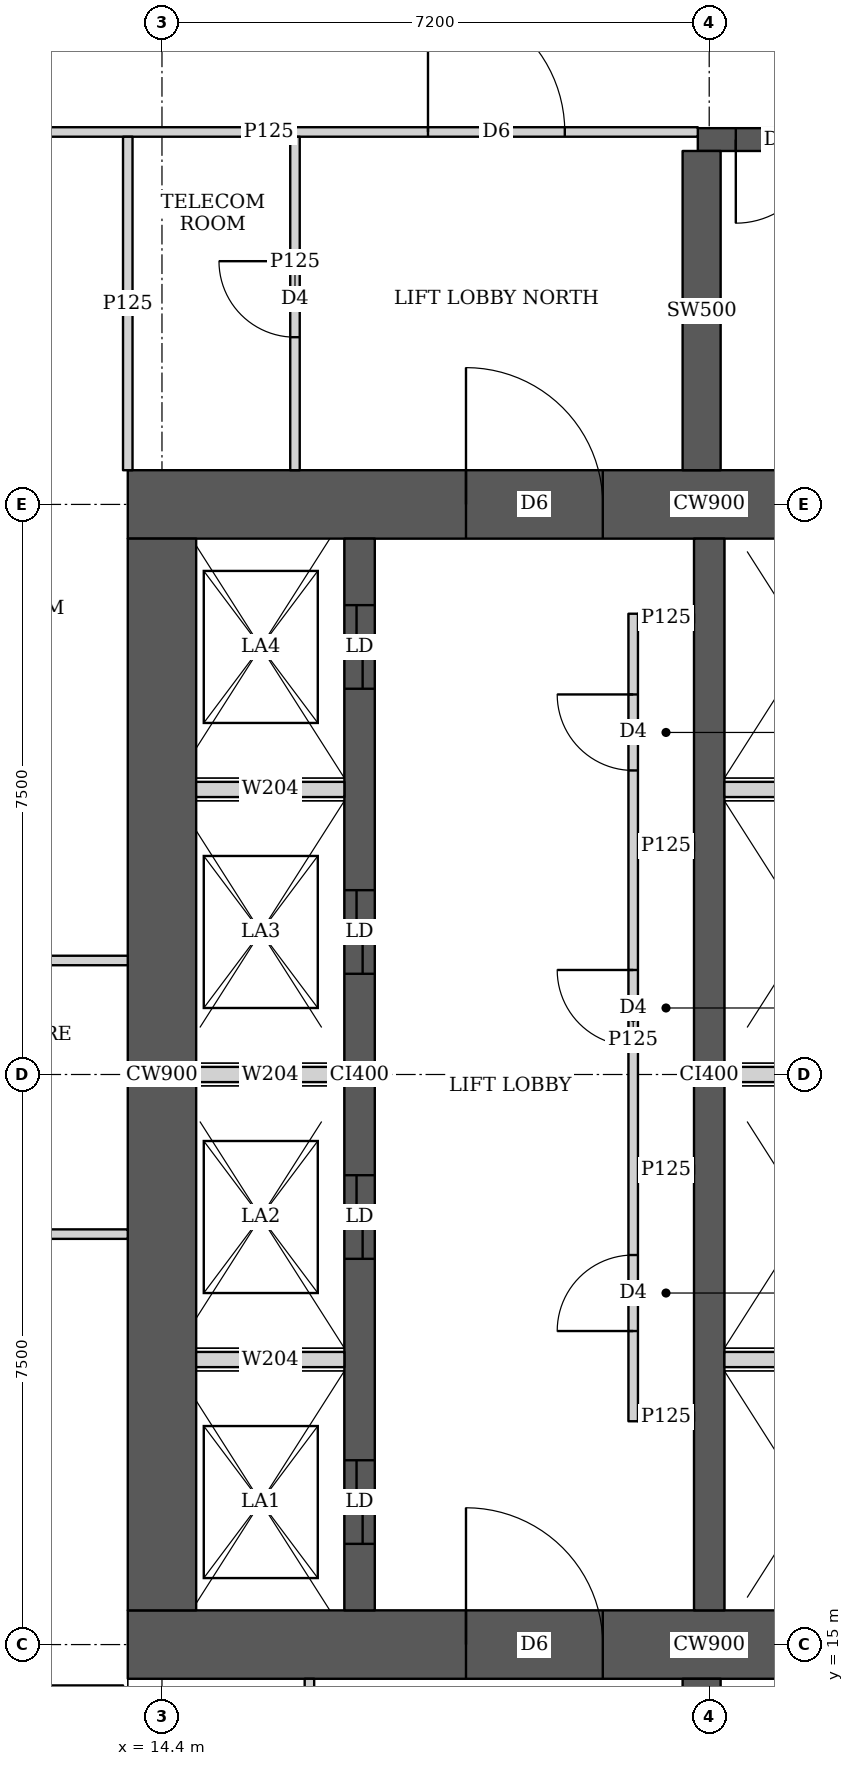
"""IFC4 building model, lengths in metres.
Left out: names, types, materials, properties, quantities, classifications, styles, units other than length and angle.
Written with IfcOpenShell. Run it as: python <this file> out.ifc"""

import sys

from ifc_helpers import new_model, si_unit, direction, frame, frame_2d, origin, place, context, subcontext, project, spatial, rectangle, extrude, element, fill, save


model = new_model("IFC4")
c1 = context("Model", 3, precision=1e-05, world=origin(), true_north=direction((0.0, 1.0)))
c2 = subcontext(c1, "Body", "Model", "MODEL_VIEW")
j1 = project(units=[si_unit("LENGTHUNIT", "METRE"), si_unit("PLANEANGLEUNIT", "RADIAN")], contexts=[c1])
p1 = place(None, origin())
s1 = spatial("IfcSite", under=j1, at=p1, CompositionType="ELEMENT")
p2 = place(p1, origin())
s2 = spatial("IfcBuilding", under=s1, at=p2, CompositionType="ELEMENT")
p3 = place(p2, frame((0.0, 0.0, 31.25)))
s3 = spatial("IfcBuildingStorey", under=s2, at=p3, CompositionType="ELEMENT", Elevation=31.25)
p4 = place(p3, frame((13.95, 15.0, 0.0), z_axis=(0.0, 0.0, 1.0), x_axis=(1.0, 0.0, 0.0)))
e1 = element("IfcWall", 1, at=p4, inside=s3, PredefinedType="SHEAR", context=c2, shape_type="SweptSolid", body=[
    extrude(rectangle(XDim=15.3, YDim=0.9, at=frame_2d((7.65, 0.0))), origin(), (0.0, 0.0, 1.0), 3.75),
])
p5 = place(p4, frame((4.45, 0.0, 0.0)))
e2 = element("IfcOpeningElement", 2, at=p5, cuts=e1, PredefinedType="OPENING", context=c2, shape_type="SweptSolid", body=[
    extrude(rectangle(XDim=1.8, YDim=2.1, at=frame_2d((0.9, 1.05))), frame((0.0, 0.46, 0.0), z_axis=(0.0, -1.0, 0.0), x_axis=(1.0, 0.0, 0.0)), (0.0, 0.0, 1.0), 0.92),
])
p6 = place(p4, frame((10.7, 0.0, 0.0)))
e3 = element("IfcOpeningElement", 3, at=p6, cuts=e1, PredefinedType="OPENING", context=c2, shape_type="SweptSolid", body=[
    extrude(rectangle(XDim=1.1, YDim=2.1, at=frame_2d((0.55, 1.05))), frame((0.0, 0.46, 0.0), z_axis=(0.0, -1.0, 0.0), x_axis=(1.0, 0.0, 0.0)), (0.0, 0.0, 1.0), 0.92),
])
p7 = place(p3, frame((13.95, 30.0, 0.0), z_axis=(0.0, 0.0, 1.0), x_axis=(1.0, 0.0, 0.0)))
e4 = element("IfcWall", 4, at=p7, inside=s3, PredefinedType="SHEAR", context=c2, shape_type="SweptSolid", body=[
    extrude(rectangle(XDim=15.3, YDim=0.9, at=frame_2d((7.65, 0.0))), origin(), (0.0, 0.0, 1.0), 3.75),
])
p8 = place(p7, frame((4.45, 0.0, 0.0)))
e5 = element("IfcOpeningElement", 5, at=p8, cuts=e4, PredefinedType="OPENING", context=c2, shape_type="SweptSolid", body=[
    extrude(rectangle(XDim=1.8, YDim=2.1, at=frame_2d((0.9, 1.05))), frame((0.0, 0.46, 0.0), z_axis=(0.0, -1.0, 0.0), x_axis=(1.0, 0.0, 0.0)), (0.0, 0.0, 1.0), 0.92),
])
p9 = place(p7, frame((10.7, 0.0, 0.0)))
e6 = element("IfcOpeningElement", 6, at=p9, cuts=e4, PredefinedType="OPENING", context=c2, shape_type="SweptSolid", body=[
    extrude(rectangle(XDim=1.1, YDim=2.1, at=frame_2d((0.55, 1.05))), frame((0.0, 0.46, 0.0), z_axis=(0.0, -1.0, 0.0), x_axis=(1.0, 0.0, 0.0)), (0.0, 0.0, 1.0), 0.92),
])
p10 = place(p3, frame((14.4, 15.45, 0.0), z_axis=(0.0, 0.0, 1.0), x_axis=(0.0, 1.0, 0.0)))
e7 = element("IfcWall", 7, at=p10, inside=s3, PredefinedType="SHEAR", context=c2, shape_type="SweptSolid", body=[
    extrude(rectangle(XDim=14.1, YDim=0.9, at=frame_2d((7.05, 0.0))), origin(), (0.0, 0.0, 1.0), 3.75),
])
p11 = place(p3, frame((17.0, 15.45, 0.0), z_axis=(0.0, 0.0, 1.0), x_axis=(0.0, 1.0, 0.0)))
e8 = element("IfcWall", 8, at=p11, inside=s3, PredefinedType="SHEAR", context=c2, shape_type="SweptSolid", body=[
    extrude(rectangle(XDim=14.1, YDim=0.4, at=frame_2d((7.05, 0.0))), origin(), (0.0, 0.0, 1.0), 3.75),
])
p12 = place(p11, frame((0.875, 0.0, 0.0)))
e9 = element("IfcOpeningElement", 9, at=p12, cuts=e8, PredefinedType="OPENING", context=c2, shape_type="SweptSolid", body=[
    extrude(rectangle(XDim=1.1, YDim=2.1, at=frame_2d((0.55, 1.05))), frame((0.0, 0.21, 0.0), z_axis=(0.0, -1.0, 0.0), x_axis=(1.0, 0.0, 0.0)), (0.0, 0.0, 1.0), 0.42),
])
p13 = place(p11, frame((4.625, 0.0, 0.0)))
e10 = element("IfcOpeningElement", 10, at=p13, cuts=e8, PredefinedType="OPENING", context=c2, shape_type="SweptSolid", body=[
    extrude(rectangle(XDim=1.1, YDim=2.1, at=frame_2d((0.55, 1.05))), frame((0.0, 0.21, 0.0), z_axis=(0.0, -1.0, 0.0), x_axis=(1.0, 0.0, 0.0)), (0.0, 0.0, 1.0), 0.42),
])
p14 = place(p11, frame((8.375, 0.0, 0.0)))
e11 = element("IfcOpeningElement", 11, at=p14, cuts=e8, PredefinedType="OPENING", context=c2, shape_type="SweptSolid", body=[
    extrude(rectangle(XDim=1.1, YDim=2.1, at=frame_2d((0.55, 1.05))), frame((0.0, 0.21, 0.0), z_axis=(0.0, -1.0, 0.0), x_axis=(1.0, 0.0, 0.0)), (0.0, 0.0, 1.0), 0.42),
])
p15 = place(p11, frame((12.125, 0.0, 0.0)))
e12 = element("IfcOpeningElement", 12, at=p15, cuts=e8, PredefinedType="OPENING", context=c2, shape_type="SweptSolid", body=[
    extrude(rectangle(XDim=1.1, YDim=2.1, at=frame_2d((0.55, 1.05))), frame((0.0, 0.21, 0.0), z_axis=(0.0, -1.0, 0.0), x_axis=(1.0, 0.0, 0.0)), (0.0, 0.0, 1.0), 0.42),
])
p16 = place(p3, frame((21.6, 15.45, 0.0), z_axis=(0.0, 0.0, 1.0), x_axis=(0.0, 1.0, 0.0)))
e13 = element("IfcWall", 13, at=p16, inside=s3, PredefinedType="SHEAR", context=c2, shape_type="SweptSolid", body=[
    extrude(rectangle(XDim=14.1, YDim=0.4, at=frame_2d((7.05, 0.0))), origin(), (0.0, 0.0, 1.0), 3.75),
])
p17 = place(p3, frame((21.5, 10.35, 0.0), z_axis=(0.0, 0.0, 1.0), x_axis=(0.0, 1.0, 0.0)))
e14 = element("IfcWall", 14, at=p17, inside=s3, PredefinedType="SHEAR", context=c2, shape_type="SweptSolid", body=[
    extrude(rectangle(XDim=4.2, YDim=0.5, at=frame_2d((2.1, 0.0))), origin(), (0.0, 0.0, 1.0), 3.75),
])
p18 = place(p3, frame((21.45, 34.8, 0.0), z_axis=(0.0, 0.0, 1.0), x_axis=(1.0, 0.0, 0.0)))
e15 = element("IfcWall", 15, at=p18, inside=s3, PredefinedType="SHEAR", context=c2, shape_type="SweptSolid", body=[
    extrude(rectangle(XDim=7.5, YDim=0.3, at=frame_2d((3.75, 0.0))), origin(), (0.0, 0.0, 1.0), 3.75),
])
p19 = place(p18, frame((0.5, 0.0, 0.0)))
e16 = element("IfcOpeningElement", 16, at=p19, cuts=e15, PredefinedType="OPENING", context=c2, shape_type="SweptSolid", body=[
    extrude(rectangle(XDim=1.1, YDim=2.1, at=frame_2d((0.55, 1.05))), frame((0.0, 0.16, 0.0), z_axis=(0.0, -1.0, 0.0), x_axis=(1.0, 0.0, 0.0)), (0.0, 0.0, 1.0), 0.32),
])
p20 = place(p3, frame((21.5, 30.45, 0.0), z_axis=(0.0, 0.0, 1.0), x_axis=(0.0, 1.0, 0.0)))
e17 = element("IfcWall", 17, at=p20, inside=s3, PredefinedType="SHEAR", context=c2, shape_type="SweptSolid", body=[
    extrude(rectangle(XDim=4.2, YDim=0.5, at=frame_2d((2.1, 0.0))), origin(), (0.0, 0.0, 1.0), 3.75),
])
p21 = place(p3, frame((10.163, 14.4, 0.0), z_axis=(0.0, 0.0, 1.0), x_axis=(1.0, 0.0, 0.0)))
e18 = element("IfcWall", 18, at=p21, inside=s3, PredefinedType="PARTITIONING", context=c2, shape_type="SweptSolid", body=[
    extrude(rectangle(XDim=3.725, YDim=0.125, at=frame_2d((1.862, 0.0))), origin(), (0.0, 0.0, 1.0), 3.5),
])
for number, where, z_axis, x_axis in (
    (19, (10.163, 20.4, 0.0), (0.0, 0.0, 1.0), (1.0, 0.0, 0.0)),
    (20, (10.163, 24.0, 0.0), (0.0, 0.0, 1.0), (1.0, 0.0, 0.0)),
):
    element("IfcWall", number, at=place(p3, frame(where, z_axis=z_axis, x_axis=x_axis)), inside=s3, PredefinedType="PARTITIONING", context=c2, shape_type="SweptSolid", body=[
        extrude(rectangle(XDim=3.787, YDim=0.125, at=frame_2d((1.894, 0.0))), origin(), (0.0, 0.0, 1.0), 3.5),
    ])
p22 = place(p3, frame((13.95, 30.45, 0.0), z_axis=(0.0, 0.0, 1.0), x_axis=(0.0, 1.0, 0.0)))
e21 = element("IfcWall", 21, at=p22, inside=s3, PredefinedType="PARTITIONING", context=c2, shape_type="SweptSolid", body=[
    extrude(rectangle(XDim=4.387, YDim=0.125, at=frame_2d((2.193, 0.0))), origin(), (0.0, 0.0, 1.0), 3.5),
])
p23 = place(p3, frame((10.163, 34.9, 0.0), z_axis=(0.0, 0.0, 1.0), x_axis=(1.0, 0.0, 0.0)))
e22 = element("IfcWall", 22, at=p23, inside=s3, PredefinedType="PARTITIONING", context=c2, shape_type="SweptSolid", body=[
    extrude(rectangle(XDim=11.287, YDim=0.125, at=frame_2d((5.644, 0.0))), origin(), (0.0, 0.0, 1.0), 3.5),
])
p24 = place(p23, frame((7.737, 0.0, 0.0)))
e23 = element("IfcOpeningElement", 23, at=p24, cuts=e22, PredefinedType="OPENING", context=c2, shape_type="SweptSolid", body=[
    extrude(rectangle(XDim=1.8, YDim=2.1, at=frame_2d((0.9, 1.05))), frame((0.0, 0.073, 0.0), z_axis=(0.0, -1.0, 0.0), x_axis=(1.0, 0.0, 0.0)), (0.0, 0.0, 1.0), 0.145),
])
p25 = place(p3, frame((16.34, 10.163, 0.0), z_axis=(0.0, 0.0, 1.0), x_axis=(0.0, 1.0, 0.0)))
e24 = element("IfcWall", 24, at=p25, inside=s3, PredefinedType="PARTITIONING", context=c2, shape_type="SweptSolid", body=[
    extrude(rectangle(XDim=4.387, YDim=0.125, at=frame_2d((2.193, 0.0))), origin(), (0.0, 0.0, 1.0), 3.5),
])
p26 = place(p25, frame((1.637, 0.0, 0.0)))
e25 = element("IfcOpeningElement", 25, at=p26, cuts=e24, PredefinedType="OPENING", context=c2, shape_type="SweptSolid", body=[
    extrude(rectangle(XDim=1.0, YDim=2.1, at=frame_2d((0.5, 1.05))), frame((0.0, 0.073, 0.0), z_axis=(0.0, -1.0, 0.0), x_axis=(1.0, 0.0, 0.0)), (0.0, 0.0, 1.0), 0.145),
])
p27 = place(p3, frame((16.15, 30.45, 0.0), z_axis=(0.0, 0.0, 1.0), x_axis=(0.0, 1.0, 0.0)))
e26 = element("IfcWall", 26, at=p27, inside=s3, PredefinedType="PARTITIONING", context=c2, shape_type="SweptSolid", body=[
    extrude(rectangle(XDim=4.387, YDim=0.125, at=frame_2d((2.193, 0.0))), origin(), (0.0, 0.0, 1.0), 3.5),
])
p28 = place(p27, frame((1.75, 0.0, 0.0)))
e27 = element("IfcOpeningElement", 27, at=p28, cuts=e26, PredefinedType="OPENING", context=c2, shape_type="SweptSolid", body=[
    extrude(rectangle(XDim=1.0, YDim=2.1, at=frame_2d((0.5, 1.05))), frame((0.0, 0.073, 0.0), z_axis=(0.0, -1.0, 0.0), x_axis=(1.0, 0.0, 0.0)), (0.0, 0.0, 1.0), 0.145),
])
p29 = place(p3, frame((20.6, 17.938, 0.0), z_axis=(0.0, 0.0, 1.0), x_axis=(0.0, 1.0, 0.0)))
e28 = element("IfcWall", 28, at=p29, inside=s3, PredefinedType="PARTITIONING", context=c2, shape_type="SweptSolid", body=[
    extrude(rectangle(XDim=10.624, YDim=0.125, at=frame_2d((5.312, 0.0))), origin(), (0.0, 0.0, 1.0), 3.5),
])
p30 = place(p29, frame((1.187, 0.0, 0.0)))
e29 = element("IfcOpeningElement", 29, at=p30, cuts=e28, PredefinedType="OPENING", context=c2, shape_type="SweptSolid", body=[
    extrude(rectangle(XDim=1.0, YDim=2.1, at=frame_2d((0.5, 1.05))), frame((0.0, 0.073, 0.0), z_axis=(0.0, -1.0, 0.0), x_axis=(1.0, 0.0, 0.0)), (0.0, 0.0, 1.0), 0.145),
])
p31 = place(p29, frame((4.937, 0.0, 0.0)))
e30 = element("IfcOpeningElement", 30, at=p31, cuts=e28, PredefinedType="OPENING", context=c2, shape_type="SweptSolid", body=[
    extrude(rectangle(XDim=1.0, YDim=2.1, at=frame_2d((0.5, 1.05))), frame((0.0, 0.073, 0.0), z_axis=(0.0, -1.0, 0.0), x_axis=(1.0, 0.0, 0.0)), (0.0, 0.0, 1.0), 0.145),
])
p32 = place(p29, frame((8.562, 0.0, 0.0)))
e31 = element("IfcOpeningElement", 31, at=p32, cuts=e28, PredefinedType="OPENING", context=c2, shape_type="SweptSolid", body=[
    extrude(rectangle(XDim=1.0, YDim=2.1, at=frame_2d((0.5, 1.05))), frame((0.0, 0.073, 0.0), z_axis=(0.0, -1.0, 0.0), x_axis=(1.0, 0.0, 0.0)), (0.0, 0.0, 1.0), 0.145),
])
for number, where, z_axis, x_axis in (
    (32, (20.663, 18.0, 0.0), (0.0, 0.0, 1.0), (1.0, 0.0, 0.0)),
    (33, (20.663, 28.5, 0.0), (0.0, 0.0, 1.0), (1.0, 0.0, 0.0)),
    (34, (20.663, 21.25, 0.0), (0.0, 0.0, 1.0), (1.0, 0.0, 0.0)),
    (35, (20.663, 25.5, 0.0), (0.0, 0.0, 1.0), (1.0, 0.0, 0.0)),
):
    element("IfcWall", number, at=place(p3, frame(where, z_axis=z_axis, x_axis=x_axis)), inside=s3, PredefinedType="PARTITIONING", context=c2, shape_type="SweptSolid", body=[
        extrude(rectangle(XDim=0.737, YDim=0.125, at=frame_2d((0.368, 0.0))), origin(), (0.0, 0.0, 1.0), 3.5),
    ])
p33 = place(p3, frame((14.85, 18.75, 0.0), z_axis=(0.0, 0.0, 1.0), x_axis=(1.0, 0.0, 0.0)))
e36 = element("IfcWall", 36, at=p33, inside=s3, PredefinedType="SOLIDWALL", context=c2, shape_type="SweptSolid", body=[
    extrude(rectangle(XDim=1.95, YDim=0.2, at=frame_2d((0.975, 0.0))), origin(), (0.0, 0.0, 1.0), 3.5),
])
p34 = place(p3, frame((21.8, 18.75, 0.0), z_axis=(0.0, 0.0, 1.0), x_axis=(1.0, 0.0, 0.0)))
e37 = element("IfcWall", 37, at=p34, inside=s3, PredefinedType="SOLIDWALL", context=c2, shape_type="SweptSolid", body=[
    extrude(rectangle(XDim=2.2, YDim=0.2, at=frame_2d((1.1, 0.0))), origin(), (0.0, 0.0, 1.0), 3.5),
])
p35 = place(p3, frame((14.85, 22.5, 0.0), z_axis=(0.0, 0.0, 1.0), x_axis=(1.0, 0.0, 0.0)))
e38 = element("IfcWall", 38, at=p35, inside=s3, PredefinedType="SOLIDWALL", context=c2, shape_type="SweptSolid", body=[
    extrude(rectangle(XDim=1.95, YDim=0.2, at=frame_2d((0.975, 0.0))), origin(), (0.0, 0.0, 1.0), 3.5),
])
p36 = place(p3, frame((21.8, 22.5, 0.0), z_axis=(0.0, 0.0, 1.0), x_axis=(1.0, 0.0, 0.0)))
e39 = element("IfcWall", 39, at=p36, inside=s3, PredefinedType="SOLIDWALL", context=c2, shape_type="SweptSolid", body=[
    extrude(rectangle(XDim=2.2, YDim=0.2, at=frame_2d((1.1, 0.0))), origin(), (0.0, 0.0, 1.0), 3.5),
])
p37 = place(p3, frame((14.85, 26.25, 0.0), z_axis=(0.0, 0.0, 1.0), x_axis=(1.0, 0.0, 0.0)))
e40 = element("IfcWall", 40, at=p37, inside=s3, PredefinedType="SOLIDWALL", context=c2, shape_type="SweptSolid", body=[
    extrude(rectangle(XDim=1.95, YDim=0.2, at=frame_2d((0.975, 0.0))), origin(), (0.0, 0.0, 1.0), 3.5),
])
p38 = place(p3, frame((21.8, 26.25, 0.0), z_axis=(0.0, 0.0, 1.0), x_axis=(1.0, 0.0, 0.0)))
e41 = element("IfcWall", 41, at=p38, inside=s3, PredefinedType="SOLIDWALL", context=c2, shape_type="SweptSolid", body=[
    extrude(rectangle(XDim=2.2, YDim=0.2, at=frame_2d((1.1, 0.0))), origin(), (0.0, 0.0, 1.0), 3.5),
])
p39 = place(p28, origin())
e42 = element("IfcDoor", 42, at=p39, inside=s3, OperationType="SINGLE_SWING_RIGHT", PredefinedType="DOOR", context=c2, shape_type="SweptSolid", body=[
    extrude(rectangle(XDim=1.0, YDim=2.1, at=frame_2d((0.5, 1.05))), frame((0.0, 0.025, 0.0), z_axis=(0.0, -1.0, 0.0), x_axis=(1.0, 0.0, 0.0)), (0.0, 0.0, 1.0), 0.05),
])
fill(e27, e42)
p40 = place(p24, origin())
e43 = element("IfcDoor", 43, at=p40, inside=s3, OperationType="DOUBLE_DOOR_SINGLE_SWING", PredefinedType="DOOR", context=c2, shape_type="SweptSolid", body=[
    extrude(rectangle(XDim=1.8, YDim=2.1, at=frame_2d((0.9, 1.05))), frame((0.0, 0.025, 0.0), z_axis=(0.0, -1.0, 0.0), x_axis=(1.0, 0.0, 0.0)), (0.0, 0.0, 1.0), 0.05),
])
fill(e23, e43)
p41 = place(p30, origin())
e44 = element("IfcDoor", 44, at=p41, inside=s3, OperationType="SINGLE_SWING_LEFT", PredefinedType="DOOR", context=c2, shape_type="SweptSolid", body=[
    extrude(rectangle(XDim=1.0, YDim=2.1, at=frame_2d((0.5, 1.05))), frame((0.0, 0.025, 0.0), z_axis=(0.0, -1.0, 0.0), x_axis=(1.0, 0.0, 0.0)), (0.0, 0.0, 1.0), 0.05),
])
fill(e29, e44)
p42 = place(p31, origin())
e45 = element("IfcDoor", 45, at=p42, inside=s3, OperationType="SINGLE_SWING_RIGHT", PredefinedType="DOOR", context=c2, shape_type="SweptSolid", body=[
    extrude(rectangle(XDim=1.0, YDim=2.1, at=frame_2d((0.5, 1.05))), frame((0.0, 0.025, 0.0), z_axis=(0.0, -1.0, 0.0), x_axis=(1.0, 0.0, 0.0)), (0.0, 0.0, 1.0), 0.05),
])
fill(e30, e45)
p43 = place(p32, origin())
e46 = element("IfcDoor", 46, at=p43, inside=s3, OperationType="SINGLE_SWING_RIGHT", PredefinedType="DOOR", context=c2, shape_type="SweptSolid", body=[
    extrude(rectangle(XDim=1.0, YDim=2.1, at=frame_2d((0.5, 1.05))), frame((0.0, 0.025, 0.0), z_axis=(0.0, -1.0, 0.0), x_axis=(1.0, 0.0, 0.0)), (0.0, 0.0, 1.0), 0.05),
])
fill(e31, e46)
p44 = place(p5, origin())
e47 = element("IfcDoor", 47, at=p44, inside=s3, OperationType="DOUBLE_DOOR_SINGLE_SWING", PredefinedType="DOOR", context=c2, shape_type="SweptSolid", body=[
    extrude(rectangle(XDim=1.8, YDim=2.1, at=frame_2d((0.9, 1.05))), frame((0.0, 0.025, 0.0), z_axis=(0.0, -1.0, 0.0), x_axis=(1.0, 0.0, 0.0)), (0.0, 0.0, 1.0), 0.05),
])
fill(e2, e47)
p45 = place(p8, origin())
e48 = element("IfcDoor", 48, at=p45, inside=s3, OperationType="DOUBLE_DOOR_SINGLE_SWING", PredefinedType="DOOR", context=c2, shape_type="SweptSolid", body=[
    extrude(rectangle(XDim=1.8, YDim=2.1, at=frame_2d((0.9, 1.05))), frame((0.0, 0.025, 0.0), z_axis=(0.0, -1.0, 0.0), x_axis=(1.0, 0.0, 0.0)), (0.0, 0.0, 1.0), 0.05),
])
fill(e5, e48)
p46 = place(p12, origin())
e49 = element("IfcDoor", 49, at=p46, inside=s3, OperationType="DOUBLE_DOOR_SLIDING", PredefinedType="DOOR", context=c2, shape_type="SweptSolid", body=[
    extrude(rectangle(XDim=1.1, YDim=2.1, at=frame_2d((0.55, 1.05))), frame((0.0, 0.025, 0.0), z_axis=(0.0, -1.0, 0.0), x_axis=(1.0, 0.0, 0.0)), (0.0, 0.0, 1.0), 0.05),
])
fill(e9, e49)
p47 = place(p13, origin())
e50 = element("IfcDoor", 50, at=p47, inside=s3, OperationType="DOUBLE_DOOR_SLIDING", PredefinedType="DOOR", context=c2, shape_type="SweptSolid", body=[
    extrude(rectangle(XDim=1.1, YDim=2.1, at=frame_2d((0.55, 1.05))), frame((0.0, 0.025, 0.0), z_axis=(0.0, -1.0, 0.0), x_axis=(1.0, 0.0, 0.0)), (0.0, 0.0, 1.0), 0.05),
])
fill(e10, e50)
p48 = place(p14, origin())
e51 = element("IfcDoor", 51, at=p48, inside=s3, OperationType="DOUBLE_DOOR_SLIDING", PredefinedType="DOOR", context=c2, shape_type="SweptSolid", body=[
    extrude(rectangle(XDim=1.1, YDim=2.1, at=frame_2d((0.55, 1.05))), frame((0.0, 0.025, 0.0), z_axis=(0.0, -1.0, 0.0), x_axis=(1.0, 0.0, 0.0)), (0.0, 0.0, 1.0), 0.05),
])
fill(e11, e51)
p49 = place(p15, origin())
e52 = element("IfcDoor", 52, at=p49, inside=s3, OperationType="DOUBLE_DOOR_SLIDING", PredefinedType="DOOR", context=c2, shape_type="SweptSolid", body=[
    extrude(rectangle(XDim=1.1, YDim=2.1, at=frame_2d((0.55, 1.05))), frame((0.0, 0.025, 0.0), z_axis=(0.0, -1.0, 0.0), x_axis=(1.0, 0.0, 0.0)), (0.0, 0.0, 1.0), 0.05),
])
fill(e12, e52)
p50 = place(p19, origin())
e53 = element("IfcDoor", 53, at=p50, inside=s3, OperationType="SINGLE_SWING_RIGHT", PredefinedType="DOOR", context=c2, shape_type="SweptSolid", body=[
    extrude(rectangle(XDim=1.1, YDim=2.1, at=frame_2d((0.55, 1.05))), frame((0.0, 0.025, 0.0), z_axis=(0.0, -1.0, 0.0), x_axis=(1.0, 0.0, 0.0)), (0.0, 0.0, 1.0), 0.05),
])
fill(e16, e53)
save(model, sys.argv[1])
